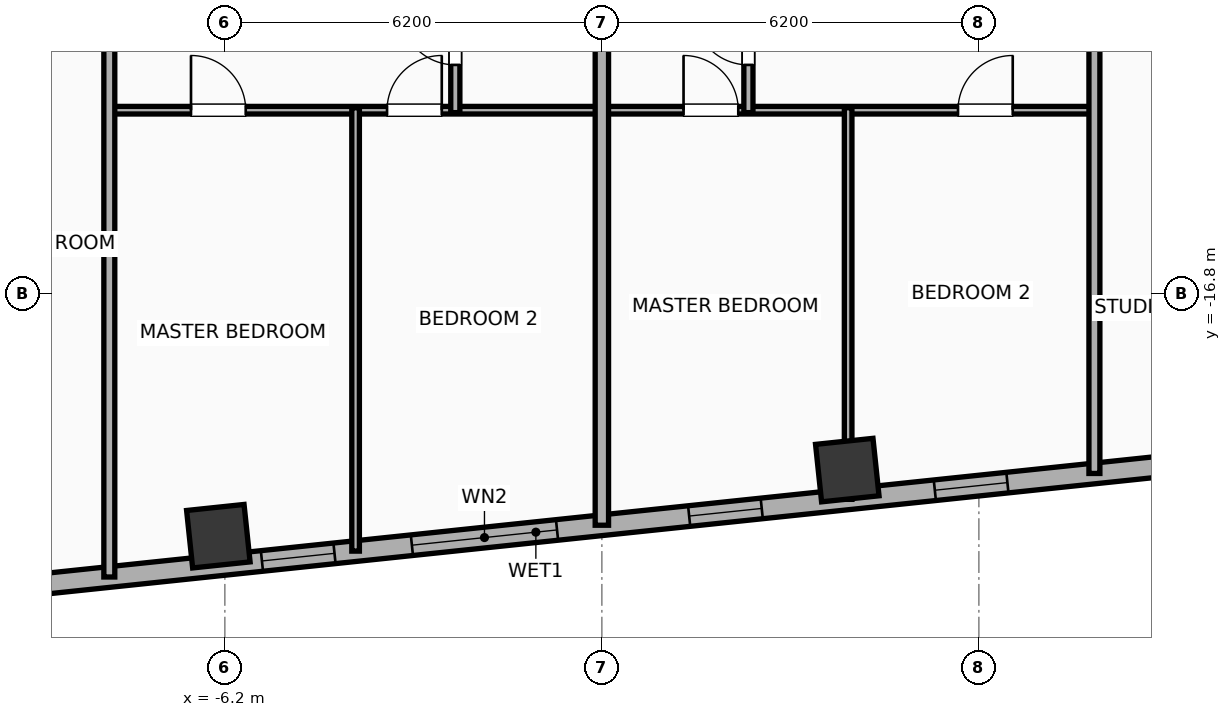
"""IFC4 building model, lengths in metres.
Left out: names, types, materials, properties, quantities, classifications, styles, units other than length and angle.
Written with IfcOpenShell. Run it as: python <this file> out.ifc"""

import sys

from ifc_helpers import new_model, si_unit, direction, frame, frame_2d, origin, origin_2d, place, context, subcontext, project, spatial, rectangle, hollow_rectangle, extrude, element, fill, save


model = new_model("IFC4")
c1 = context("Model", 3, precision=1e-05, world=origin(), true_north=direction((0.0, 1.0)))
c2 = subcontext(c1, "Body", "Model", "MODEL_VIEW")
j1 = project(units=[si_unit("LENGTHUNIT", "METRE"), si_unit("PLANEANGLEUNIT", "RADIAN")], contexts=[c1])
p1 = place(None, origin())
s1 = spatial("IfcSite", under=j1, at=p1, CompositionType="ELEMENT")
p2 = place(p1, origin())
s2 = spatial("IfcBuilding", under=s1, at=p2, CompositionType="ELEMENT")
p3 = place(p2, frame((0.0, 0.0, 163.8)))
s3 = spatial("IfcBuildingStorey", under=s2, at=p3, CompositionType="ELEMENT", Elevation=163.8)
for number, where, z_axis, x_axis in (
    (1, (-6.307, -20.785, 0.0), (0.0, 0.0, 1.0), (0.995, 0.105, 0.0)),
    (2, (4.036, -19.698, 0.0), (0.0, 0.0, 1.0), (0.995, 0.105, 0.0)),
):
    element("IfcColumn", number, at=place(p3, frame(where, z_axis=z_axis, x_axis=x_axis)), inside=s3, PredefinedType="COLUMN", context=c2, shape_type="SweptSolid", body=[
        extrude(hollow_rectangle(XDim=0.95, YDim=0.95, WallThickness=0.032, at=origin_2d()), origin(), (0.0, 0.0, 1.0), 3.9),
    ])
p4 = place(p3, frame((24.756, -18.003, 0.0), z_axis=(0.0, 0.0, 1.0), x_axis=(-0.99452160744, -0.104531202687, 0.0)))
e3 = element("IfcWall", 3, at=p4, inside=s3, PredefinedType="ELEMENTEDWALL", context=c2, shape_type="SweptSolid", body=[
    extrude(rectangle(XDim=51.967, YDim=0.34, at=frame_2d((25.983, 0.0))), origin(), (0.0, 0.0, 1.0), 3.65),
])
p5 = place(p4, frame((25.633, 0.0, 0.75)))
e4 = element("IfcOpeningElement", 4, at=p5, cuts=e3, PredefinedType="OPENING", context=c2, shape_type="SweptSolid", body=[
    extrude(rectangle(XDim=2.4, YDim=2.1, at=frame_2d((1.2, 1.05))), frame((0.0, 0.18, 0.0), z_axis=(0.0, -1.0, 0.0), x_axis=(1.0, 0.0, 0.0)), (0.0, 0.0, 1.0), 0.36),
])
p6 = place(p4, frame((42.369, 0.0, 0.75)))
e5 = element("IfcOpeningElement", 5, at=p6, cuts=e3, PredefinedType="OPENING", context=c2, shape_type="SweptSolid", body=[
    extrude(rectangle(XDim=1.2, YDim=2.05, at=frame_2d((0.6, 1.025))), frame((0.0, 0.18, 0.0), z_axis=(0.0, -1.0, 0.0), x_axis=(1.0, 0.0, 0.0)), (0.0, 0.0, 1.0), 0.36),
])
p7 = place(p4, frame((34.085, 0.0, 0.75)))
e6 = element("IfcOpeningElement", 6, at=p7, cuts=e3, PredefinedType="OPENING", context=c2, shape_type="SweptSolid", body=[
    extrude(rectangle(XDim=1.2, YDim=2.05, at=frame_2d((0.6, 1.025))), frame((0.0, 0.18, 0.0), z_axis=(0.0, -1.0, 0.0), x_axis=(1.0, 0.0, 0.0)), (0.0, 0.0, 1.0), 0.36),
])
p8 = place(p4, frame((36.993, 0.0, 0.75)))
e7 = element("IfcOpeningElement", 7, at=p8, cuts=e3, PredefinedType="OPENING", context=c2, shape_type="SweptSolid", body=[
    extrude(rectangle(XDim=1.2, YDim=2.05, at=frame_2d((0.6, 1.025))), frame((0.0, 0.18, 0.0), z_axis=(0.0, -1.0, 0.0), x_axis=(1.0, 0.0, 0.0)), (0.0, 0.0, 1.0), 0.36),
])
p9 = place(p4, frame((14.397, 0.0, 0.75)))
e8 = element("IfcOpeningElement", 8, at=p9, cuts=e3, PredefinedType="OPENING", context=c2, shape_type="SweptSolid", body=[
    extrude(rectangle(XDim=1.2, YDim=2.05, at=frame_2d((0.6, 1.025))), frame((0.0, 0.18, 0.0), z_axis=(0.0, -1.0, 0.0), x_axis=(1.0, 0.0, 0.0)), (0.0, 0.0, 1.0), 0.36),
])
p10 = place(p4, frame((11.489, 0.0, 0.75)))
e9 = element("IfcOpeningElement", 9, at=p10, cuts=e3, PredefinedType="OPENING", context=c2, shape_type="SweptSolid", body=[
    extrude(rectangle(XDim=1.2, YDim=2.05, at=frame_2d((0.6, 1.025))), frame((0.0, 0.18, 0.0), z_axis=(0.0, -1.0, 0.0), x_axis=(1.0, 0.0, 0.0)), (0.0, 0.0, 1.0), 0.36),
])
p11 = place(p4, frame((8.521, 0.0, 0.75)))
e10 = element("IfcOpeningElement", 10, at=p11, cuts=e3, PredefinedType="OPENING", context=c2, shape_type="SweptSolid", body=[
    extrude(rectangle(XDim=1.2, YDim=2.05, at=frame_2d((0.6, 1.025))), frame((0.0, 0.18, 0.0), z_axis=(0.0, -1.0, 0.0), x_axis=(1.0, 0.0, 0.0)), (0.0, 0.0, 1.0), 0.36),
])
p12 = place(p4, frame((5.582, 0.0, 0.75)))
e11 = element("IfcOpeningElement", 11, at=p12, cuts=e3, PredefinedType="OPENING", context=c2, shape_type="SweptSolid", body=[
    extrude(rectangle(XDim=1.2, YDim=2.05, at=frame_2d((0.6, 1.025))), frame((0.0, 0.18, 0.0), z_axis=(0.0, -1.0, 0.0), x_axis=(1.0, 0.0, 0.0)), (0.0, 0.0, 1.0), 0.36),
])
p13 = place(p4, frame((29.313, 0.0, 0.75)))
e12 = element("IfcOpeningElement", 12, at=p13, cuts=e3, PredefinedType="OPENING", context=c2, shape_type="SweptSolid", body=[
    extrude(rectangle(XDim=1.2, YDim=2.05, at=frame_2d((0.6, 1.025))), frame((0.0, 0.18, 0.0), z_axis=(0.0, -1.0, 0.0), x_axis=(1.0, 0.0, 0.0)), (0.0, 0.0, 1.0), 0.36),
])
p14 = place(p4, frame((22.248, 0.0, 0.75)))
e13 = element("IfcOpeningElement", 13, at=p14, cuts=e3, PredefinedType="OPENING", context=c2, shape_type="SweptSolid", body=[
    extrude(rectangle(XDim=1.2, YDim=2.05, at=frame_2d((0.6, 1.025))), frame((0.0, 0.18, 0.0), z_axis=(0.0, -1.0, 0.0), x_axis=(1.0, 0.0, 0.0)), (0.0, 0.0, 1.0), 0.36),
])
p15 = place(p4, frame((18.186, 0.0, 0.75)))
e14 = element("IfcOpeningElement", 14, at=p15, cuts=e3, PredefinedType="OPENING", context=c2, shape_type="SweptSolid", body=[
    extrude(rectangle(XDim=1.2, YDim=2.05, at=frame_2d((0.6, 1.025))), frame((0.0, 0.18, 0.0), z_axis=(0.0, -1.0, 0.0), x_axis=(1.0, 0.0, 0.0)), (0.0, 0.0, 1.0), 0.36),
])
p16 = place(p4, frame((47.879, 0.0, 0.75)))
e15 = element("IfcOpeningElement", 15, at=p16, cuts=e3, PredefinedType="OPENING", context=c2, shape_type="SweptSolid", body=[
    extrude(rectangle(XDim=1.2, YDim=2.05, at=frame_2d((0.6, 1.025))), frame((0.0, 0.18, 0.0), z_axis=(0.0, -1.0, 0.0), x_axis=(1.0, 0.0, 0.0)), (0.0, 0.0, 1.0), 0.36),
])
p17 = place(p4, frame((49.844, 0.0, 0.75)))
e16 = element("IfcOpeningElement", 16, at=p17, cuts=e3, PredefinedType="OPENING", context=c2, shape_type="SweptSolid", body=[
    extrude(rectangle(XDim=1.2, YDim=2.05, at=frame_2d((0.6, 1.025))), frame((0.0, 0.18, 0.0), z_axis=(0.0, -1.0, 0.0), x_axis=(1.0, 0.0, 0.0)), (0.0, 0.0, 1.0), 0.36),
])
p18 = place(p3, frame((-8.08, -13.78, 0.0), z_axis=(0.0, 0.0, 1.0), x_axis=(1.0, 0.0, 0.0)))
e17 = element("IfcWall", 17, at=p18, inside=s3, PredefinedType="PARTITIONING", context=c2, shape_type="SweptSolid", body=[
    extrude(rectangle(XDim=8.06, YDim=0.125, at=frame_2d((4.03, 0.0))), origin(), (0.0, 0.0, 1.0), 3.65),
])
p19 = place(p18, frame((1.323, 0.0, 0.0)))
e18 = element("IfcOpeningElement", 18, at=p19, cuts=e17, PredefinedType="OPENING", context=c2, shape_type="SweptSolid", body=[
    extrude(rectangle(XDim=0.9, YDim=2.05, at=frame_2d((0.45, 1.025))), frame((0.0, 0.073, 0.0), z_axis=(0.0, -1.0, 0.0), x_axis=(1.0, 0.0, 0.0)), (0.0, 0.0, 1.0), 0.145),
])
p20 = place(p18, frame((4.547, 0.0, 0.0)))
e19 = element("IfcOpeningElement", 19, at=p20, cuts=e17, PredefinedType="OPENING", context=c2, shape_type="SweptSolid", body=[
    extrude(rectangle(XDim=0.9, YDim=2.05, at=frame_2d((0.45, 1.025))), frame((0.0, 0.073, 0.0), z_axis=(0.0, -1.0, 0.0), x_axis=(1.0, 0.0, 0.0)), (0.0, 0.0, 1.0), 0.145),
])
p21 = place(p3, frame((-2.41, -13.82, 0.0), z_axis=(0.0, 0.0, 1.0), x_axis=(0.0, 1.0, 0.0)))
e20 = element("IfcWall", 20, at=p21, inside=s3, PredefinedType="PLUMBINGWALL", context=c2, shape_type="SweptSolid", body=[
    extrude(rectangle(XDim=2.47, YDim=0.15, at=frame_2d((1.235, 0.0))), origin(), (0.0, 0.0, 1.0), 3.65),
])
p22 = place(p21, frame((0.785, 0.0, 0.0)))
e21 = element("IfcOpeningElement", 21, at=p22, cuts=e20, PredefinedType="OPENING", context=c2, shape_type="SweptSolid", body=[
    extrude(rectangle(XDim=0.9, YDim=2.05, at=frame_2d((0.45, 1.025))), frame((0.0, 0.085, 0.0), z_axis=(0.0, -1.0, 0.0), x_axis=(1.0, 0.0, 0.0)), (0.0, 0.0, 1.0), 0.17),
])
p23 = place(p3, frame((-4.05, -21.031, 0.0), z_axis=(0.0, 0.0, 1.0), x_axis=(0.0, 1.0, 0.0)))
e22 = element("IfcWall", 22, at=p23, inside=s3, PredefinedType="PARTITIONING", context=c2, shape_type="SweptSolid", body=[
    extrude(rectangle(XDim=7.291, YDim=0.125, at=frame_2d((3.646, 0.0))), origin(), (0.0, 0.0, 1.0), 3.65),
])
p24 = place(p3, frame((-8.1, -21.456, 0.0), z_axis=(0.0, 0.0, 1.0), x_axis=(0.0, 1.0, 0.0)))
e23 = element("IfcWall", 23, at=p24, inside=s3, PredefinedType="PARTITIONING", context=c2, shape_type="SweptSolid", body=[
    extrude(rectangle(XDim=12.516, YDim=0.18, at=frame_2d((6.258, 0.0))), origin(), (0.0, 0.0, 1.0), 3.65),
])
p25 = place(p24, frame((11.267, 0.0, 0.0)))
e24 = element("IfcOpeningElement", 24, at=p25, cuts=e23, PredefinedType="OPENING", context=c2, shape_type="SweptSolid", body=[
    extrude(rectangle(XDim=0.9, YDim=2.05, at=frame_2d((0.45, 1.025))), frame((0.0, 0.1, 0.0), z_axis=(0.0, -1.0, 0.0), x_axis=(1.0, 0.0, 0.0)), (0.0, 0.0, 1.0), 0.2),
])
p26 = place(p3, frame((0.02, -13.78, 0.0), z_axis=(0.0, 0.0, 1.0), x_axis=(1.0, 0.0, 0.0)))
e25 = element("IfcWall", 25, at=p26, inside=s3, PredefinedType="PARTITIONING", context=c2, shape_type="SweptSolid", body=[
    extrude(rectangle(XDim=8.06, YDim=0.125, at=frame_2d((4.03, 0.0))), origin(), (0.0, 0.0, 1.0), 3.65),
])
p27 = place(p26, frame((1.323, 0.0, 0.0)))
e26 = element("IfcOpeningElement", 26, at=p27, cuts=e25, PredefinedType="OPENING", context=c2, shape_type="SweptSolid", body=[
    extrude(rectangle(XDim=0.9, YDim=2.05, at=frame_2d((0.45, 1.025))), frame((0.0, 0.073, 0.0), z_axis=(0.0, -1.0, 0.0), x_axis=(1.0, 0.0, 0.0)), (0.0, 0.0, 1.0), 0.145),
])
p28 = place(p26, frame((5.837, 0.0, 0.0)))
e27 = element("IfcOpeningElement", 27, at=p28, cuts=e25, PredefinedType="OPENING", context=c2, shape_type="SweptSolid", body=[
    extrude(rectangle(XDim=0.9, YDim=2.05, at=frame_2d((0.45, 1.025))), frame((0.0, 0.073, 0.0), z_axis=(0.0, -1.0, 0.0), x_axis=(1.0, 0.0, 0.0)), (0.0, 0.0, 1.0), 0.145),
])
p29 = place(p3, frame((2.41, -13.82, 0.0), z_axis=(0.0, 0.0, 1.0), x_axis=(0.0, 1.0, 0.0)))
e28 = element("IfcWall", 28, at=p29, inside=s3, PredefinedType="PLUMBINGWALL", context=c2, shape_type="SweptSolid", body=[
    extrude(rectangle(XDim=2.47, YDim=0.15, at=frame_2d((1.235, 0.0))), origin(), (0.0, 0.0, 1.0), 3.65),
])
p30 = place(p29, frame((0.785, 0.0, 0.0)))
e29 = element("IfcOpeningElement", 29, at=p30, cuts=e28, PredefinedType="OPENING", context=c2, shape_type="SweptSolid", body=[
    extrude(rectangle(XDim=0.9, YDim=2.05, at=frame_2d((0.45, 1.025))), frame((0.0, 0.085, 0.0), z_axis=(0.0, -1.0, 0.0), x_axis=(1.0, 0.0, 0.0)), (0.0, 0.0, 1.0), 0.17),
])
p31 = place(p3, frame((4.05, -20.179, 0.0), z_axis=(0.0, 0.0, 1.0), x_axis=(0.0, 1.0, 0.0)))
e30 = element("IfcWall", 30, at=p31, inside=s3, PredefinedType="PARTITIONING", context=c2, shape_type="SweptSolid", body=[
    extrude(rectangle(XDim=6.439, YDim=0.125, at=frame_2d((3.22, 0.0))), origin(), (0.0, 0.0, 1.0), 3.04),
])
p32 = place(p3, frame((8.1, -19.754, 0.0), z_axis=(0.0, 0.0, 1.0), x_axis=(0.0, 1.0, 0.0)))
e31 = element("IfcWall", 31, at=p32, inside=s3, PredefinedType="PARTITIONING", context=c2, shape_type="SweptSolid", body=[
    extrude(rectangle(XDim=10.814, YDim=0.18, at=frame_2d((5.407, 0.0))), origin(), (0.0, 0.0, 1.0), 3.65),
])
p33 = place(p32, frame((9.564, 0.0, 0.0)))
e32 = element("IfcOpeningElement", 32, at=p33, cuts=e31, PredefinedType="OPENING", context=c2, shape_type="SweptSolid", body=[
    extrude(rectangle(XDim=0.9, YDim=2.05, at=frame_2d((0.45, 1.025))), frame((0.0, 0.1, 0.0), z_axis=(0.0, -1.0, 0.0), x_axis=(1.0, 0.0, 0.0)), (0.0, 0.0, 1.0), 0.2),
])
p34 = place(p3, frame((0.0, -20.605, 0.0), z_axis=(0.0, 0.0, 1.0), x_axis=(0.0, 1.0, 0.0)))
e33 = element("IfcWall", 33, at=p34, inside=s3, PredefinedType="PARTITIONING", context=c2, shape_type="SweptSolid", body=[
    extrude(rectangle(XDim=11.665, YDim=0.22, at=frame_2d((5.833, 0.0))), origin(), (0.0, 0.0, 1.0), 3.65),
])
p35 = place(p5, origin())
e34 = element("IfcWindow", 34, at=p35, inside=s3, PartitioningType="SINGLE_PANEL", PredefinedType="WINDOW", context=c2, shape_type="SweptSolid", body=[
    extrude(rectangle(XDim=2.4, YDim=2.1, at=frame_2d((1.2, 1.05))), frame((0.0, 0.03, 0.0), z_axis=(0.0, -1.0, 0.0), x_axis=(1.0, 0.0, 0.0)), (0.0, 0.0, 1.0), 0.06),
])
fill(e4, e34)
p36 = place(p13, origin())
e35 = element("IfcWindow", 35, at=p36, inside=s3, PartitioningType="SINGLE_PANEL", PredefinedType="WINDOW", context=c2, shape_type="SweptSolid", body=[
    extrude(rectangle(XDim=1.2, YDim=2.05, at=frame_2d((0.6, 1.025))), frame((0.0, 0.03, 0.0), z_axis=(0.0, -1.0, 0.0), x_axis=(1.0, 0.0, 0.0)), (0.0, 0.0, 1.0), 0.06),
])
fill(e12, e35)
p37 = place(p14, origin())
e36 = element("IfcWindow", 36, at=p37, inside=s3, PartitioningType="SINGLE_PANEL", PredefinedType="WINDOW", context=c2, shape_type="SweptSolid", body=[
    extrude(rectangle(XDim=1.2, YDim=2.05, at=frame_2d((0.6, 1.025))), frame((0.0, 0.03, 0.0), z_axis=(0.0, -1.0, 0.0), x_axis=(1.0, 0.0, 0.0)), (0.0, 0.0, 1.0), 0.06),
])
fill(e13, e36)
p38 = place(p15, origin())
e37 = element("IfcWindow", 37, at=p38, inside=s3, PartitioningType="SINGLE_PANEL", PredefinedType="WINDOW", context=c2, shape_type="SweptSolid", body=[
    extrude(rectangle(XDim=1.2, YDim=2.05, at=frame_2d((0.6, 1.025))), frame((0.0, 0.03, 0.0), z_axis=(0.0, -1.0, 0.0), x_axis=(1.0, 0.0, 0.0)), (0.0, 0.0, 1.0), 0.06),
])
fill(e14, e37)
p39 = place(p19, origin())
e38 = element("IfcDoor", 38, at=p39, inside=s3, OperationType="SINGLE_SWING_LEFT", PredefinedType="DOOR", context=c2, shape_type="SweptSolid", body=[
    extrude(rectangle(XDim=0.9, YDim=2.05, at=frame_2d((0.45, 1.025))), frame((0.0, 0.025, 0.0), z_axis=(0.0, -1.0, 0.0), x_axis=(1.0, 0.0, 0.0)), (0.0, 0.0, 1.0), 0.05),
])
fill(e18, e38)
p40 = place(p20, origin())
e39 = element("IfcDoor", 39, at=p40, inside=s3, OperationType="SINGLE_SWING_RIGHT", PredefinedType="DOOR", context=c2, shape_type="SweptSolid", body=[
    extrude(rectangle(XDim=0.9, YDim=2.05, at=frame_2d((0.45, 1.025))), frame((0.0, 0.025, 0.0), z_axis=(0.0, -1.0, 0.0), x_axis=(1.0, 0.0, 0.0)), (0.0, 0.0, 1.0), 0.05),
])
fill(e19, e39)
p41 = place(p22, origin())
e40 = element("IfcDoor", 40, at=p41, inside=s3, OperationType="SINGLE_SWING_RIGHT", PredefinedType="DOOR", context=c2, shape_type="SweptSolid", body=[
    extrude(rectangle(XDim=0.9, YDim=2.05, at=frame_2d((0.45, 1.025))), frame((0.0, 0.025, 0.0), z_axis=(0.0, -1.0, 0.0), x_axis=(1.0, 0.0, 0.0)), (0.0, 0.0, 1.0), 0.05),
])
fill(e21, e40)
p42 = place(p27, origin())
e41 = element("IfcDoor", 41, at=p42, inside=s3, OperationType="SINGLE_SWING_LEFT", PredefinedType="DOOR", context=c2, shape_type="SweptSolid", body=[
    extrude(rectangle(XDim=0.9, YDim=2.05, at=frame_2d((0.45, 1.025))), frame((0.0, 0.025, 0.0), z_axis=(0.0, -1.0, 0.0), x_axis=(1.0, 0.0, 0.0)), (0.0, 0.0, 1.0), 0.05),
])
fill(e26, e41)
p43 = place(p28, origin())
e42 = element("IfcDoor", 42, at=p43, inside=s3, OperationType="SINGLE_SWING_RIGHT", PredefinedType="DOOR", context=c2, shape_type="SweptSolid", body=[
    extrude(rectangle(XDim=0.9, YDim=2.05, at=frame_2d((0.45, 1.025))), frame((0.0, 0.025, 0.0), z_axis=(0.0, -1.0, 0.0), x_axis=(1.0, 0.0, 0.0)), (0.0, 0.0, 1.0), 0.05),
])
fill(e27, e42)
p44 = place(p30, origin())
e43 = element("IfcDoor", 43, at=p44, inside=s3, OperationType="SINGLE_SWING_RIGHT", PredefinedType="DOOR", context=c2, shape_type="SweptSolid", body=[
    extrude(rectangle(XDim=0.9, YDim=2.05, at=frame_2d((0.45, 1.025))), frame((0.0, 0.025, 0.0), z_axis=(0.0, -1.0, 0.0), x_axis=(1.0, 0.0, 0.0)), (0.0, 0.0, 1.0), 0.05),
])
fill(e29, e43)
save(model, sys.argv[1])
